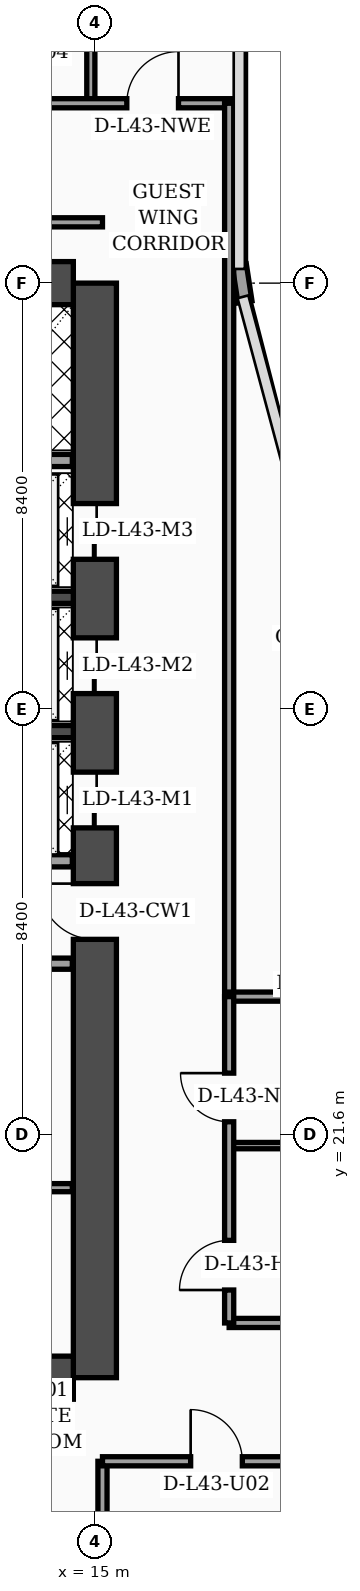
"""IFC4 building model, lengths in metres.
Left out: names, types, materials, properties, quantities, classifications, styles, units other than length and angle.
Written with IfcOpenShell. Run it as: python <this file> out.ifc"""

import sys

from ifc_helpers import new_model, si_unit, direction, frame, frame_2d, origin, place, context, subcontext, project, spatial, rectangle, extrude, element, fill, save


model = new_model("IFC4")
c1 = context("Model", 3, precision=1e-05, world=origin(), true_north=direction((0.0, 1.0)))
c2 = subcontext(c1, "Body", "Model", "MODEL_VIEW")
j1 = project(units=[si_unit("LENGTHUNIT", "METRE"), si_unit("PLANEANGLEUNIT", "RADIAN")], contexts=[c1])
p1 = place(None, origin())
s1 = spatial("IfcSite", under=j1, at=p1, CompositionType="ELEMENT")
p2 = place(p1, origin())
s2 = spatial("IfcBuilding", under=s1, at=p2, CompositionType="ELEMENT")
p3 = place(p2, frame((0.0, 0.0, 175.1)))
s3 = spatial("IfcBuildingStorey", under=s2, at=p3, CompositionType="ELEMENT", Elevation=175.1)
p4 = place(p3, frame((15.0, 16.8, 0.0), z_axis=(0.0, 0.0, 1.0), x_axis=(0.0, 1.0, 0.0)))
e1 = element("IfcWall", 1, at=p4, inside=s3, PredefinedType="SHEAR", context=c2, shape_type="SweptSolid", body=[
    extrude(rectangle(XDim=21.6, YDim=0.85, at=frame_2d((10.8, 0.0))), origin(), (0.0, 0.0, 1.0), 3.56),
])
p5 = place(p4, frame((8.65, 0.0, 0.0)))
e2 = element("IfcOpeningElement", 2, at=p5, cuts=e1, PredefinedType="OPENING", context=c2, shape_type="SweptSolid", body=[
    extrude(rectangle(XDim=1.1, YDim=2.2, at=frame_2d((0.55, 1.1))), frame((0.0, 0.435, 0.0), z_axis=(0.0, -1.0, 0.0), x_axis=(1.0, 0.0, 0.0)), (0.0, 0.0, 1.0), 0.87),
])
p6 = place(p4, frame((10.85, 0.0, 0.0)))
e3 = element("IfcOpeningElement", 3, at=p6, cuts=e1, PredefinedType="OPENING", context=c2, shape_type="SweptSolid", body=[
    extrude(rectangle(XDim=1.1, YDim=2.2, at=frame_2d((0.55, 1.1))), frame((0.0, 0.435, 0.0), z_axis=(0.0, -1.0, 0.0), x_axis=(1.0, 0.0, 0.0)), (0.0, 0.0, 1.0), 0.87),
])
p7 = place(p4, frame((13.5, 0.0, 0.0)))
e4 = element("IfcOpeningElement", 4, at=p7, cuts=e1, PredefinedType="OPENING", context=c2, shape_type="SweptSolid", body=[
    extrude(rectangle(XDim=1.1, YDim=2.2, at=frame_2d((0.55, 1.1))), frame((0.0, 0.435, 0.0), z_axis=(0.0, -1.0, 0.0), x_axis=(1.0, 0.0, 0.0)), (0.0, 0.0, 1.0), 0.87),
])
p8 = place(p4, frame((16.15, 0.0, 0.0)))
e5 = element("IfcOpeningElement", 5, at=p8, cuts=e1, PredefinedType="OPENING", context=c2, shape_type="SweptSolid", body=[
    extrude(rectangle(XDim=1.1, YDim=2.2, at=frame_2d((0.55, 1.1))), frame((0.0, 0.435, 0.0), z_axis=(0.0, -1.0, 0.0), x_axis=(1.0, 0.0, 0.0)), (0.0, 0.0, 1.0), 0.87),
])
for number, where, z_axis, x_axis in (
    (6, (4.625, 38.4, 0.0), (0.0, 0.0, 1.0), (1.0, 0.0, 0.0)),
    (7, (4.625, 16.8, 0.0), (0.0, 0.0, 1.0), (1.0, 0.0, 0.0)),
):
    element("IfcWall", number, at=place(p3, frame(where, z_axis=z_axis, x_axis=x_axis)), inside=s3, PredefinedType="SHEAR", context=c2, shape_type="SweptSolid", body=[
        extrude(rectangle(XDim=9.95, YDim=0.85, at=frame_2d((4.975, 0.0))), origin(), (0.0, 0.0, 1.0), 3.56),
    ])
for number, where, z_axis, x_axis in (
    (8, (12.18, 29.55, 0.0), (0.0, 0.0, 1.0), (1.0, 0.0, 0.0)),
    (9, (12.18, 32.2, 0.0), (0.0, 0.0, 1.0), (1.0, 0.0, 0.0)),
):
    element("IfcWall", number, at=place(p3, frame(where, z_axis=z_axis, x_axis=x_axis)), inside=s3, PredefinedType="SOLIDWALL", context=c2, shape_type="SweptSolid", body=[
        extrude(rectangle(XDim=2.395, YDim=0.24, at=frame_2d((1.198, 0.0))), origin(), (0.0, 0.0, 1.0), 3.56),
    ])
p9 = place(p3, frame((17.962, 38.03, 0.0), z_axis=(0.0, 0.0, 1.0), x_axis=(-0.15141125477, 0.988470855377, 0.0)))
e10 = element("IfcWall", 10, at=p9, inside=s3, PredefinedType="SOLIDWALL", context=c2, shape_type="SweptSolid", body=[
    extrude(rectangle(XDim=0.739, YDim=0.28, at=frame_2d((0.369, 0.0))), origin(), (0.0, 0.0, 1.0), 3.56),
])
p10 = place(p3, frame((9.68, 20.55, 0.0), z_axis=(0.0, 0.0, 1.0), x_axis=(1.0, 0.0, 0.0)))
e11 = element("IfcWall", 11, at=p10, inside=s3, PredefinedType="PARTITIONING", context=c2, shape_type="SweptSolid", body=[
    extrude(rectangle(XDim=4.875, YDim=0.16, at=frame_2d((2.438, 0.0))), origin(), (0.0, 0.0, 1.0), 3.56),
])
p11 = place(p10, frame((1.1, 0.0, 0.0)))
e12 = element("IfcOpeningElement", 12, at=p11, cuts=e11, PredefinedType="OPENING", context=c2, shape_type="SweptSolid", body=[
    extrude(rectangle(XDim=0.98, YDim=2.15, at=frame_2d((0.49, 1.075))), frame((0.0, 0.09, 0.0), z_axis=(0.0, -1.0, 0.0), x_axis=(1.0, 0.0, 0.0)), (0.0, 0.0, 1.0), 0.18),
])
p12 = place(p3, frame((9.68, 24.97, 0.0), z_axis=(0.0, 0.0, 1.0), x_axis=(1.0, 0.0, 0.0)))
e13 = element("IfcWall", 13, at=p12, inside=s3, PredefinedType="SOLIDWALL", context=c2, shape_type="SweptSolid", body=[
    extrude(rectangle(XDim=4.875, YDim=0.22, at=frame_2d((2.438, 0.0))), origin(), (0.0, 0.0, 1.0), 2.94),
])
p13 = place(p12, frame((0.9, 0.0, 0.0)))
e14 = element("IfcOpeningElement", 14, at=p13, cuts=e13, PredefinedType="OPENING", context=c2, shape_type="SweptSolid", body=[
    extrude(rectangle(XDim=0.98, YDim=2.15, at=frame_2d((0.49, 1.075))), frame((0.0, 0.12, 0.0), z_axis=(0.0, -1.0, 0.0), x_axis=(1.0, 0.0, 0.0)), (0.0, 0.0, 1.0), 0.24),
])
p14 = place(p3, frame((12.25, 27.0, 0.0), z_axis=(0.0, 0.0, 1.0), x_axis=(1.0, 0.0, 0.0)))
e15 = element("IfcWall", 15, at=p14, inside=s3, PredefinedType="SOLIDWALL", context=c2, shape_type="SweptSolid", body=[
    extrude(rectangle(XDim=2.305, YDim=0.24, at=frame_2d((1.152, 0.0))), origin(), (0.0, 0.0, 1.0), 3.56),
])
p15 = place(p3, frame((9.66, 34.9, 0.0), z_axis=(0.0, 0.0, 1.0), x_axis=(1.0, 0.0, 0.0)))
e16 = element("IfcWall", 16, at=p15, inside=s3, PredefinedType="SOLIDWALL", context=c2, shape_type="SweptSolid", body=[
    extrude(rectangle(XDim=4.895, YDim=0.24, at=frame_2d((2.448, 0.0))), origin(), (0.0, 0.0, 1.0), 3.56),
])
p16 = place(p3, frame((15.15, 2.44, 0.0), z_axis=(0.0, 0.0, 1.0), x_axis=(0.0, 1.0, 0.0)))
e17 = element("IfcWall", 17, at=p16, inside=s3, PredefinedType="PARTITIONING", context=c2, shape_type="SweptSolid", body=[
    extrude(rectangle(XDim=12.71, YDim=0.18, at=frame_2d((6.355, 0.0))), origin(), (0.0, 0.0, 1.0), 3.04),
])
p17 = place(p3, frame((15.15, 15.15, 0.0), z_axis=(0.0, 0.0, 1.0), x_axis=(1.0, 0.0, 0.0)))
e18 = element("IfcWall", 18, at=p17, inside=s3, PredefinedType="PARTITIONING", context=c2, shape_type="SweptSolid", body=[
    extrude(rectangle(XDim=6.45, YDim=0.18, at=frame_2d((3.225, 0.0))), origin(), (0.0, 0.0, 1.0), 2.49),
])
p18 = place(p17, frame((1.74, 0.0, 0.0)))
e19 = element("IfcOpeningElement", 19, at=p18, cuts=e18, PredefinedType="OPENING", context=c2, shape_type="SweptSolid", body=[
    extrude(rectangle(XDim=1.02, YDim=2.2, at=frame_2d((0.51, 1.1))), frame((0.0, 0.1, 0.0), z_axis=(0.0, -1.0, 0.0), x_axis=(1.0, 0.0, 0.0)), (0.0, 0.0, 1.0), 0.2),
])
p19 = place(p3, frame((14.92, 41.95, 0.0), z_axis=(0.0, 0.0, 1.0), x_axis=(0.0, 1.0, 0.0)))
e20 = element("IfcWall", 20, at=p19, inside=s3, PredefinedType="PARTITIONING", context=c2, shape_type="SweptSolid", body=[
    extrude(rectangle(XDim=5.85, YDim=0.16, at=frame_2d((2.925, 0.0))), origin(), (0.0, 0.0, 1.0), 3.04),
])
p20 = place(p3, frame((0.08, 41.95, 0.0), z_axis=(0.0, 0.0, 1.0), x_axis=(1.0, 0.0, 0.0)))
e21 = element("IfcWall", 21, at=p20, inside=s3, PredefinedType="PARTITIONING", context=c2, shape_type="SweptSolid", body=[
    extrude(rectangle(XDim=17.77, YDim=0.18, at=frame_2d((8.885, 0.0))), origin(), (0.0, 0.0, 1.0), 2.94),
])
p21 = place(p20, frame((0.9, 0.0, 0.0)))
e22 = element("IfcOpeningElement", 22, at=p21, cuts=e21, PredefinedType="OPENING", context=c2, shape_type="SweptSolid", body=[
    extrude(rectangle(XDim=1.02, YDim=2.2, at=frame_2d((0.51, 1.1))), frame((0.0, 0.1, 0.0), z_axis=(0.0, -1.0, 0.0), x_axis=(1.0, 0.0, 0.0)), (0.0, 0.0, 1.0), 0.2),
])
p22 = place(p20, frame((4.75, 0.0, 0.0)))
e23 = element("IfcOpeningElement", 23, at=p22, cuts=e21, PredefinedType="OPENING", context=c2, shape_type="SweptSolid", body=[
    extrude(rectangle(XDim=1.02, YDim=2.2, at=frame_2d((0.51, 1.1))), frame((0.0, 0.1, 0.0), z_axis=(0.0, -1.0, 0.0), x_axis=(1.0, 0.0, 0.0)), (0.0, 0.0, 1.0), 0.2),
])
p23 = place(p20, frame((10.63, 0.0, 0.0)))
e24 = element("IfcOpeningElement", 24, at=p23, cuts=e21, PredefinedType="OPENING", context=c2, shape_type="SweptSolid", body=[
    extrude(rectangle(XDim=1.02, YDim=2.2, at=frame_2d((0.51, 1.1))), frame((0.0, 0.1, 0.0), z_axis=(0.0, -1.0, 0.0), x_axis=(1.0, 0.0, 0.0)), (0.0, 0.0, 1.0), 0.2),
])
p24 = place(p20, frame((15.55, 0.0, 0.0)))
e25 = element("IfcOpeningElement", 25, at=p24, cuts=e21, PredefinedType="OPENING", context=c2, shape_type="SweptSolid", body=[
    extrude(rectangle(XDim=1.02, YDim=2.2, at=frame_2d((0.51, 1.1))), frame((0.0, 0.1, 0.0), z_axis=(0.0, -1.0, 0.0), x_axis=(1.0, 0.0, 0.0)), (0.0, 0.0, 1.0), 0.2),
])
p25 = place(p3, frame((17.65, 24.3, 0.0), z_axis=(0.0, 0.0, 1.0), x_axis=(0.0, 1.0, 0.0)))
e26 = element("IfcWall", 26, at=p25, inside=s3, PredefinedType="PARTITIONING", context=c2, shape_type="SweptSolid", body=[
    extrude(rectangle(XDim=17.65, YDim=0.18, at=frame_2d((8.825, 0.0))), origin(), (0.0, 0.0, 1.0), 2.94),
])
p26 = place(p3, frame((3.755, 39.6, 0.0), z_axis=(0.0, 0.0, 1.0), x_axis=(1.0, 0.0, 0.0)))
e27 = element("IfcWall", 27, at=p26, inside=s3, PredefinedType="PARTITIONING", context=c2, shape_type="SweptSolid", body=[
    extrude(rectangle(XDim=11.395, YDim=0.18, at=frame_2d((5.698, 0.0))), origin(), (0.0, 0.0, 1.0), 2.94),
])
p27 = place(p3, frame((17.65, 17.88, 0.0), z_axis=(0.0, 0.0, 1.0), x_axis=(1.0, 0.0, 0.0)))
e28 = element("IfcWall", 28, at=p27, inside=s3, PredefinedType="PARTITIONING", context=c2, shape_type="SweptSolid", body=[
    extrude(rectangle(XDim=3.9, YDim=0.18, at=frame_2d((1.95, 0.0))), origin(), (0.0, 0.0, 1.0), 3.09),
])
p28 = place(p3, frame((17.65, 21.38, 0.0), z_axis=(0.0, 0.0, 1.0), x_axis=(1.0, 0.0, 0.0)))
e29 = element("IfcWall", 29, at=p28, inside=s3, PredefinedType="PARTITIONING", context=c2, shape_type="SweptSolid", body=[
    extrude(rectangle(XDim=3.9, YDim=0.125, at=frame_2d((1.95, 0.0))), origin(), (0.0, 0.0, 1.0), 3.56),
])
p29 = place(p3, frame((17.65, 24.32, 0.0), z_axis=(0.0, 0.0, 1.0), x_axis=(1.0, 0.0, 0.0)))
e30 = element("IfcWall", 30, at=p29, inside=s3, PredefinedType="PARTITIONING", context=c2, shape_type="SweptSolid", body=[
    extrude(rectangle(XDim=3.95, YDim=0.18, at=frame_2d((1.975, 0.0))), origin(), (0.0, 0.0, 1.0), 3.56),
])
p30 = place(p3, frame((17.65, 17.88, 0.0), z_axis=(0.0, 0.0, 1.0), x_axis=(0.0, 1.0, 0.0)))
e31 = element("IfcWall", 31, at=p30, inside=s3, PredefinedType="PARTITIONING", context=c2, shape_type="SweptSolid", body=[
    extrude(rectangle(XDim=6.44, YDim=0.18, at=frame_2d((3.22, 0.0))), origin(), (0.0, 0.0, 1.0), 3.09),
])
p31 = place(p30, frame((0.65, 0.0, 0.0)))
e32 = element("IfcOpeningElement", 32, at=p31, cuts=e31, PredefinedType="OPENING", context=c2, shape_type="SweptSolid", body=[
    extrude(rectangle(XDim=0.98, YDim=2.15, at=frame_2d((0.49, 1.075))), frame((0.0, 0.1, 0.0), z_axis=(0.0, -1.0, 0.0), x_axis=(1.0, 0.0, 0.0)), (0.0, 0.0, 1.0), 0.2),
])
p32 = place(p30, frame((3.97, 0.0, 0.0)))
e33 = element("IfcOpeningElement", 33, at=p32, cuts=e31, PredefinedType="OPENING", context=c2, shape_type="SweptSolid", body=[
    extrude(rectangle(XDim=0.96, YDim=2.2, at=frame_2d((0.48, 1.1))), frame((0.0, 0.1, 0.0), z_axis=(0.0, -1.0, 0.0), x_axis=(1.0, 0.0, 0.0)), (0.0, 0.0, 1.0), 0.2),
])
p33 = place(p18, origin())
e34 = element("IfcDoor", 34, at=p33, inside=s3, OperationType="SINGLE_SWING_LEFT", PredefinedType="DOOR", context=c2, shape_type="SweptSolid", body=[
    extrude(rectangle(XDim=1.02, YDim=2.2, at=frame_2d((0.51, 1.1))), frame((0.0, 0.025, 0.0), z_axis=(0.0, -1.0, 0.0), x_axis=(1.0, 0.0, 0.0)), (0.0, 0.0, 1.0), 0.05),
])
fill(e19, e34)
p34 = place(p24, origin())
e35 = element("IfcDoor", 35, at=p34, inside=s3, OperationType="SINGLE_SWING_RIGHT", PredefinedType="DOOR", context=c2, shape_type="SweptSolid", body=[
    extrude(rectangle(XDim=1.02, YDim=2.2, at=frame_2d((0.51, 1.1))), frame((0.0, 0.025, 0.0), z_axis=(0.0, -1.0, 0.0), x_axis=(1.0, 0.0, 0.0)), (0.0, 0.0, 1.0), 0.05),
])
fill(e25, e35)
p35 = place(p31, origin())
e36 = element("IfcDoor", 36, at=p35, inside=s3, OperationType="SINGLE_SWING_LEFT", PredefinedType="DOOR", context=c2, shape_type="SweptSolid", body=[
    extrude(rectangle(XDim=0.98, YDim=2.15, at=frame_2d((0.49, 1.075))), frame((0.0, 0.025, 0.0), z_axis=(0.0, -1.0, 0.0), x_axis=(1.0, 0.0, 0.0)), (0.0, 0.0, 1.0), 0.05),
])
fill(e32, e36)
p36 = place(p32, origin())
e37 = element("IfcDoor", 37, at=p36, inside=s3, OperationType="SINGLE_SWING_RIGHT", PredefinedType="DOOR", context=c2, shape_type="SweptSolid", body=[
    extrude(rectangle(XDim=0.96, YDim=2.2, at=frame_2d((0.48, 1.1))), frame((0.0, 0.025, 0.0), z_axis=(0.0, -1.0, 0.0), x_axis=(1.0, 0.0, 0.0)), (0.0, 0.0, 1.0), 0.05),
])
fill(e33, e37)
p37 = place(p5, origin())
e38 = element("IfcDoor", 38, at=p37, inside=s3, OperationType="SINGLE_SWING_RIGHT", PredefinedType="DOOR", context=c2, shape_type="SweptSolid", body=[
    extrude(rectangle(XDim=1.1, YDim=2.2, at=frame_2d((0.55, 1.1))), frame((0.0, 0.025, 0.0), z_axis=(0.0, -1.0, 0.0), x_axis=(1.0, 0.0, 0.0)), (0.0, 0.0, 1.0), 0.05),
])
fill(e2, e38)
p38 = place(p6, origin())
e39 = element("IfcDoor", 39, at=p38, inside=s3, OperationType="DOUBLE_DOOR_SLIDING", PredefinedType="DOOR", context=c2, shape_type="SweptSolid", body=[
    extrude(rectangle(XDim=1.1, YDim=2.2, at=frame_2d((0.55, 1.1))), frame((0.0, 0.025, 0.0), z_axis=(0.0, -1.0, 0.0), x_axis=(1.0, 0.0, 0.0)), (0.0, 0.0, 1.0), 0.05),
])
fill(e3, e39)
p39 = place(p7, origin())
e40 = element("IfcDoor", 40, at=p39, inside=s3, OperationType="DOUBLE_DOOR_SLIDING", PredefinedType="DOOR", context=c2, shape_type="SweptSolid", body=[
    extrude(rectangle(XDim=1.1, YDim=2.2, at=frame_2d((0.55, 1.1))), frame((0.0, 0.025, 0.0), z_axis=(0.0, -1.0, 0.0), x_axis=(1.0, 0.0, 0.0)), (0.0, 0.0, 1.0), 0.05),
])
fill(e4, e40)
p40 = place(p8, origin())
e41 = element("IfcDoor", 41, at=p40, inside=s3, OperationType="DOUBLE_DOOR_SLIDING", PredefinedType="DOOR", context=c2, shape_type="SweptSolid", body=[
    extrude(rectangle(XDim=1.1, YDim=2.2, at=frame_2d((0.55, 1.1))), frame((0.0, 0.025, 0.0), z_axis=(0.0, -1.0, 0.0), x_axis=(1.0, 0.0, 0.0)), (0.0, 0.0, 1.0), 0.05),
])
fill(e5, e41)
save(model, sys.argv[1])
